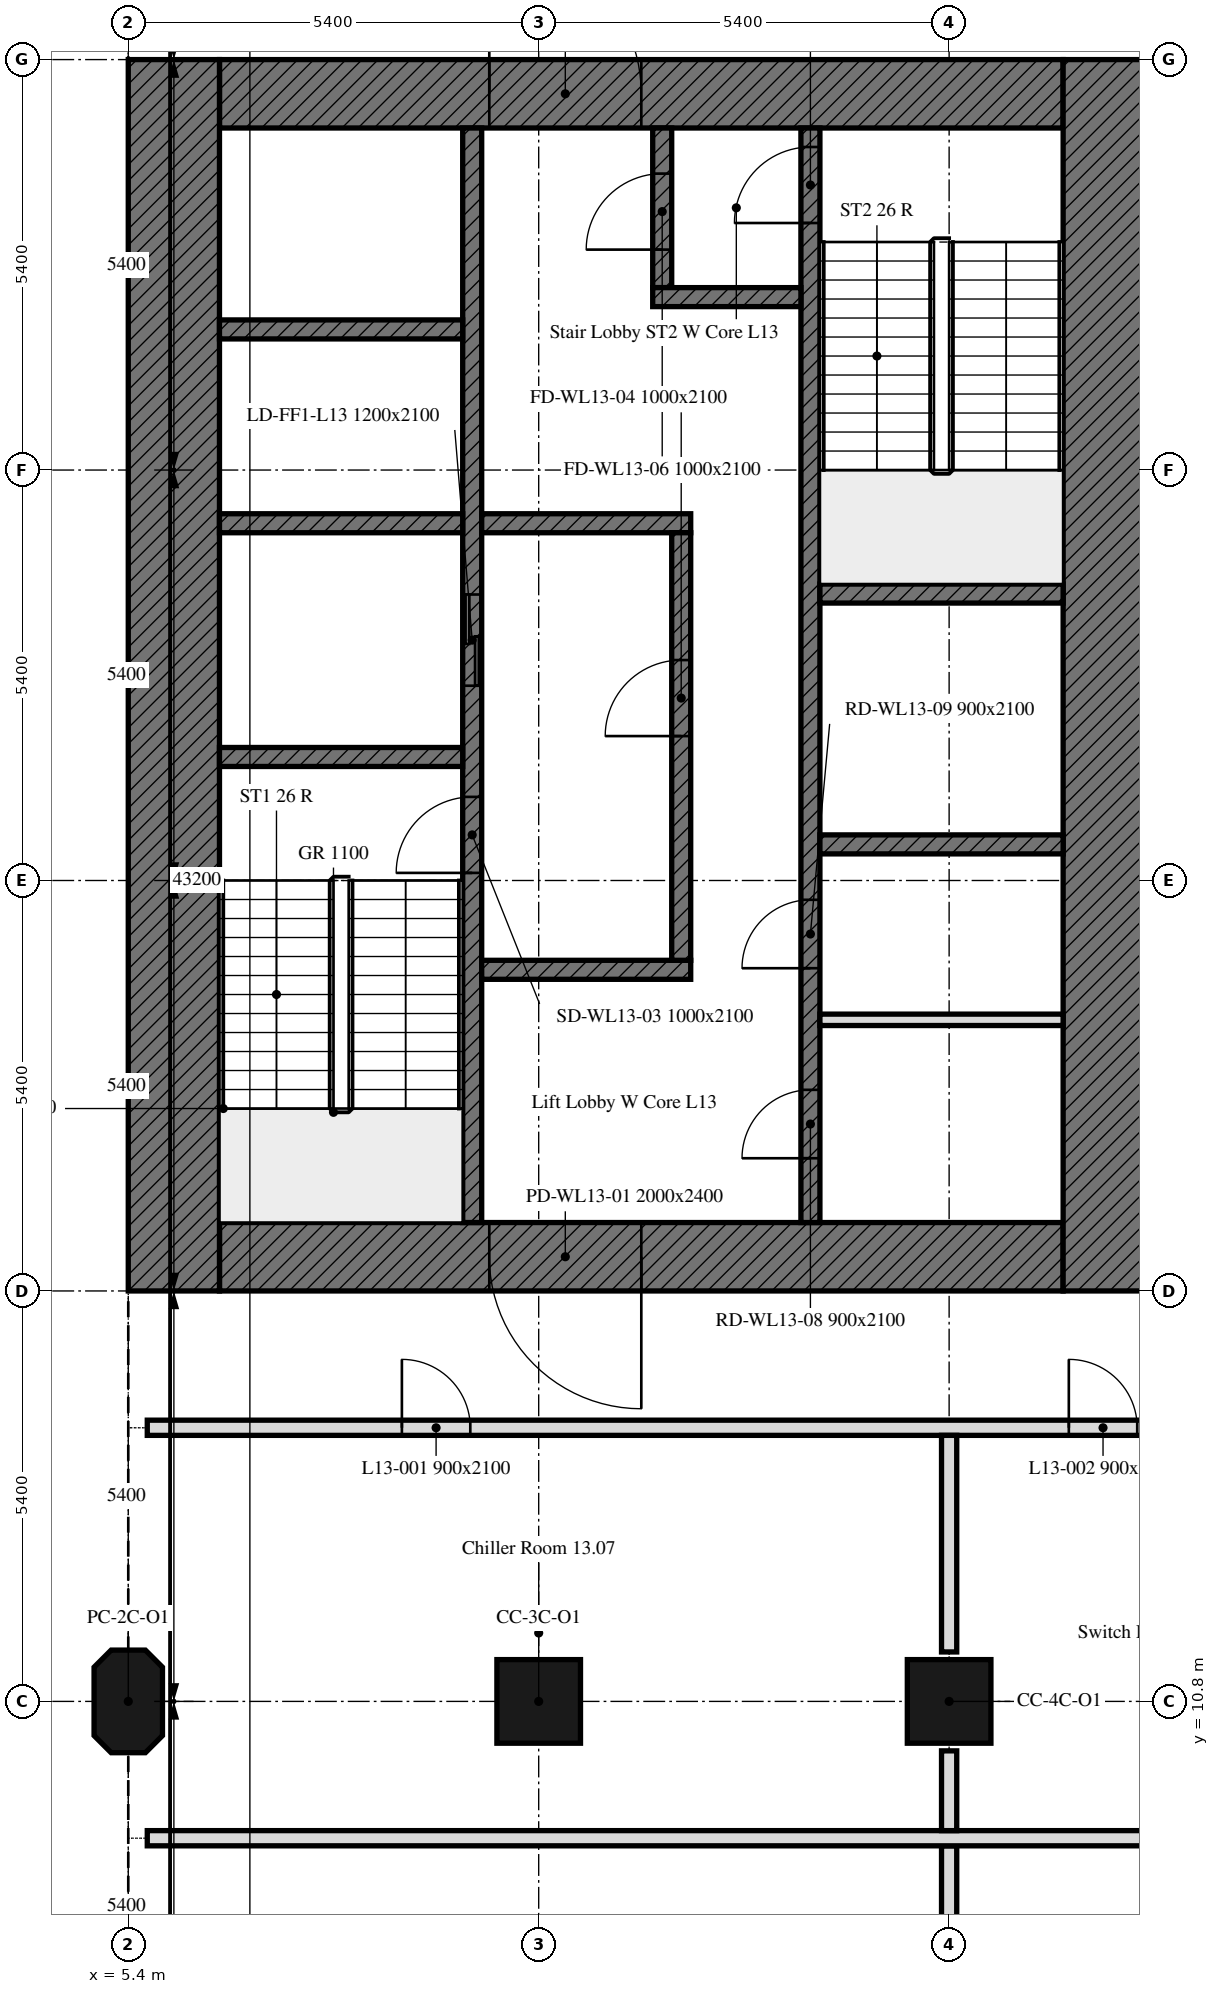
"""IFC4 building model, lengths in metres.
Left out: names, types, materials, properties, quantities, classifications, styles, units other than length and angle.
Written with IfcOpenShell. Run it as: python <this file> out.ifc"""

import sys

from ifc_helpers import new_model, si_unit, direction, frame, frame_2d, origin, origin_2d, place, context, subcontext, project, spatial, polyline, rectangle, outline, extrude, element, fill, save


model = new_model("IFC4")
c1 = context("Model", 3, precision=1e-05, world=origin(), true_north=direction((0.0, 1.0)))
c2 = subcontext(c1, "Body", "Model", "MODEL_VIEW")
j1 = project(units=[si_unit("LENGTHUNIT", "METRE"), si_unit("PLANEANGLEUNIT", "RADIAN")], contexts=[c1])
p1 = place(None, origin())
s1 = spatial("IfcSite", under=j1, at=p1, CompositionType="ELEMENT")
p2 = place(p1, origin())
s2 = spatial("IfcBuilding", under=s1, at=p2, CompositionType="ELEMENT")
p3 = place(p2, frame((0.0, 0.0, 60.2)))
s3 = spatial("IfcBuildingStorey", under=s2, at=p3, CompositionType="ELEMENT", Elevation=60.2)
p4 = place(p3, frame((5.4, 10.8, 0.0), z_axis=(0.0, 0.0, 1.0), x_axis=(0.0, 1.0, 0.0)))
e1 = element("IfcColumn", 1, at=p4, inside=s3, PredefinedType="COLUMN", context=c2, shape_type="SweptSolid", body=[
    extrude(outline(polyline([(-0.45, -0.45), (0.45, -0.45), (0.675, -0.225), (0.675, 0.225), (0.45, 0.45), (-0.45, 0.45), (-0.675, 0.225), (-0.675, -0.225), (-0.45, -0.45)])), origin(), (0.0, 0.0, 1.0), 4.5),
])
for number, where, z_axis, x_axis in (
    (2, (10.8, 10.8, 0.0), (0.0, 0.0, 1.0), (1.0, 0.0, 0.0)),
    (3, (16.2, 10.8, 0.0), (0.0, 0.0, 1.0), (1.0, 0.0, 0.0)),
):
    element("IfcColumn", number, at=place(p3, frame(where, z_axis=z_axis, x_axis=x_axis)), inside=s3, PredefinedType="COLUMN", context=c2, shape_type="SweptSolid", body=[
        extrude(rectangle(XDim=1.1, YDim=1.1, at=origin_2d()), origin(), (0.0, 0.0, 1.0), 4.5),
    ])
p5 = place(p3, frame((17.7, 16.65, 0.0), z_axis=(0.0, 0.0, 1.0), x_axis=(-1.0, 0.0, 0.0)))
e4 = element("IfcWall", 4, at=p5, inside=s3, PredefinedType="SOLIDWALL", context=c2, shape_type="SweptSolid", body=[
    extrude(rectangle(XDim=11.1, YDim=0.9, at=frame_2d((5.55, 0.0))), origin(), (0.0, 0.0, 1.0), 4.5),
])
p6 = place(p5, frame((5.55, 0.0, 0.0)))
e5 = element("IfcOpeningElement", 5, at=p6, cuts=e4, PredefinedType="OPENING", context=c2, shape_type="SweptSolid", body=[
    extrude(rectangle(XDim=2.0, YDim=2.4, at=frame_2d((1.0, 1.2))), frame((0.0, 0.45, 0.0), z_axis=(0.0, -1.0, 0.0), x_axis=(1.0, 0.0, 0.0)), (0.0, 0.0, 1.0), 0.9),
])
p7 = place(p3, frame((6.6, 31.95, 0.0), z_axis=(0.0, 0.0, 1.0), x_axis=(1.0, 0.0, 0.0)))
e6 = element("IfcWall", 6, at=p7, inside=s3, PredefinedType="SOLIDWALL", context=c2, shape_type="SweptSolid", body=[
    extrude(rectangle(XDim=11.1, YDim=0.9, at=frame_2d((5.55, 0.0))), origin(), (0.0, 0.0, 1.0), 4.5),
])
p8 = place(p7, frame((3.55, 0.0, 0.0)))
e7 = element("IfcOpeningElement", 7, at=p8, cuts=e6, PredefinedType="OPENING", context=c2, shape_type="SweptSolid", body=[
    extrude(rectangle(XDim=2.0, YDim=2.4, at=frame_2d((1.0, 1.2))), frame((0.0, 0.45, 0.0), z_axis=(0.0, -1.0, 0.0), x_axis=(1.0, 0.0, 0.0)), (0.0, 0.0, 1.0), 0.9),
])
for number, where, z_axis, x_axis in (
    (8, (6.0, 16.2, 0.0), (0.0, 0.0, 1.0), (0.0, 1.0, 0.0)),
    (9, (18.3, 32.4, 0.0), (0.0, 0.0, 1.0), (0.0, -1.0, 0.0)),
):
    element("IfcWall", number, at=place(p3, frame(where, z_axis=z_axis, x_axis=x_axis)), inside=s3, PredefinedType="SOLIDWALL", context=c2, shape_type="SweptSolid", body=[
        extrude(rectangle(XDim=16.2, YDim=1.2, at=frame_2d((8.1, 0.0))), origin(), (0.0, 0.0, 1.0), 4.5),
    ])
p9 = place(p3, frame((9.925, 17.1, 0.0), z_axis=(0.0, 0.0, 1.0), x_axis=(0.0, 1.0, 0.0)))
e10 = element("IfcWall", 10, at=p9, inside=s3, PredefinedType="SOLIDWALL", context=c2, shape_type="SweptSolid", body=[
    extrude(rectangle(XDim=14.4, YDim=0.25, at=frame_2d((7.2, 0.0))), origin(), (0.0, 0.0, 1.0), 4.5),
])
p10 = place(p9, frame((4.6, 0.0, 0.0)))
e11 = element("IfcOpeningElement", 11, at=p10, cuts=e10, PredefinedType="OPENING", context=c2, shape_type="SweptSolid", body=[
    extrude(rectangle(XDim=1.0, YDim=2.1, at=frame_2d((0.5, 1.05))), frame((0.0, 0.125, 0.0), z_axis=(0.0, -1.0, 0.0), x_axis=(1.0, 0.0, 0.0)), (0.0, 0.0, 1.0), 0.25),
])
p11 = place(p9, frame((7.062, 0.0, 0.0)))
e12 = element("IfcOpeningElement", 12, at=p11, cuts=e10, PredefinedType="OPENING", context=c2, shape_type="SweptSolid", body=[
    extrude(rectangle(XDim=1.2, YDim=2.1, at=frame_2d((0.6, 1.05))), frame((0.0, 0.125, 0.0), z_axis=(0.0, -1.0, 0.0), x_axis=(1.0, 0.0, 0.0)), (0.0, 0.0, 1.0), 0.25),
])
p12 = place(p3, frame((14.375, 17.1, 0.0), z_axis=(0.0, 0.0, 1.0), x_axis=(0.0, 1.0, 0.0)))
e13 = element("IfcWall", 13, at=p12, inside=s3, PredefinedType="SOLIDWALL", context=c2, shape_type="SweptSolid", body=[
    extrude(rectangle(XDim=14.4, YDim=0.25, at=frame_2d((7.2, 0.0))), origin(), (0.0, 0.0, 1.0), 4.5),
])
p13 = place(p12, frame((13.15, 0.0, 0.0)))
e14 = element("IfcOpeningElement", 14, at=p13, cuts=e13, PredefinedType="OPENING", context=c2, shape_type="SweptSolid", body=[
    extrude(rectangle(XDim=1.0, YDim=2.1, at=frame_2d((0.5, 1.05))), frame((0.0, 0.125, 0.0), z_axis=(0.0, -1.0, 0.0), x_axis=(1.0, 0.0, 0.0)), (0.0, 0.0, 1.0), 0.25),
])
p14 = place(p12, frame((0.846, 0.0, 0.0)))
e15 = element("IfcOpeningElement", 15, at=p14, cuts=e13, PredefinedType="OPENING", context=c2, shape_type="SweptSolid", body=[
    extrude(rectangle(XDim=0.9, YDim=2.1, at=frame_2d((0.45, 1.05))), frame((0.0, 0.125, 0.0), z_axis=(0.0, -1.0, 0.0), x_axis=(1.0, 0.0, 0.0)), (0.0, 0.0, 1.0), 0.25),
])
p15 = place(p12, frame((3.346, 0.0, 0.0)))
e16 = element("IfcOpeningElement", 16, at=p15, cuts=e13, PredefinedType="OPENING", context=c2, shape_type="SweptSolid", body=[
    extrude(rectangle(XDim=0.9, YDim=2.1, at=frame_2d((0.45, 1.05))), frame((0.0, 0.125, 0.0), z_axis=(0.0, -1.0, 0.0), x_axis=(1.0, 0.0, 0.0)), (0.0, 0.0, 1.0), 0.25),
])
for number, where, z_axis, x_axis in (
    (17, (6.6, 23.225, 0.0), (0.0, 0.0, 1.0), (1.0, 0.0, 0.0)),
    (18, (14.5, 25.375, 0.0), (0.0, 0.0, 1.0), (1.0, 0.0, 0.0)),
    (19, (14.5, 22.075, 0.0), (0.0, 0.0, 1.0), (1.0, 0.0, 0.0)),
    (20, (6.6, 26.3, 0.0), (0.0, 0.0, 1.0), (1.0, 0.0, 0.0)),
):
    element("IfcWall", number, at=place(p3, frame(where, z_axis=z_axis, x_axis=x_axis)), inside=s3, PredefinedType="SOLIDWALL", context=c2, shape_type="SweptSolid", body=[
        extrude(rectangle(XDim=3.2, YDim=0.25, at=frame_2d((1.6, 0.0))), origin(), (0.0, 0.0, 1.0), 4.5),
    ])
for number, where, z_axis, x_axis in (
    (21, (10.05, 26.3, 0.0), (0.0, 0.0, 1.0), (1.0, 0.0, 0.0)),
    (22, (10.05, 20.425, 0.0), (0.0, 0.0, 1.0), (1.0, 0.0, 0.0)),
):
    element("IfcWall", number, at=place(p3, frame(where, z_axis=z_axis, x_axis=x_axis)), inside=s3, PredefinedType="SOLIDWALL", context=c2, shape_type="SweptSolid", body=[
        extrude(rectangle(XDim=2.75, YDim=0.25, at=frame_2d((1.375, 0.0))), origin(), (0.0, 0.0, 1.0), 4.5),
    ])
p16 = place(p3, frame((12.425, 29.4, 0.0), z_axis=(0.0, 0.0, 1.0), x_axis=(0.0, 1.0, 0.0)))
e23 = element("IfcWall", 23, at=p16, inside=s3, PredefinedType="SOLIDWALL", context=c2, shape_type="SweptSolid", body=[
    extrude(rectangle(XDim=2.1, YDim=0.25, at=frame_2d((1.05, 0.0))), origin(), (0.0, 0.0, 1.0), 4.5),
])
p17 = place(p16, frame((0.5, 0.0, 0.0)))
e24 = element("IfcOpeningElement", 24, at=p17, cuts=e23, PredefinedType="OPENING", context=c2, shape_type="SweptSolid", body=[
    extrude(rectangle(XDim=1.0, YDim=2.1, at=frame_2d((0.5, 1.05))), frame((0.0, 0.125, 0.0), z_axis=(0.0, -1.0, 0.0), x_axis=(1.0, 0.0, 0.0)), (0.0, 0.0, 1.0), 0.25),
])
p18 = place(p3, frame((12.3, 29.275, 0.0), z_axis=(0.0, 0.0, 1.0), x_axis=(1.0, 0.0, 0.0)))
e25 = element("IfcWall", 25, at=p18, inside=s3, PredefinedType="SOLIDWALL", context=c2, shape_type="SweptSolid", body=[
    extrude(rectangle(XDim=1.95, YDim=0.25, at=frame_2d((0.975, 0.0))), origin(), (0.0, 0.0, 1.0), 4.5),
])
p19 = place(p3, frame((12.675, 20.55, 0.0), z_axis=(0.0, 0.0, 1.0), x_axis=(0.0, 1.0, 0.0)))
e26 = element("IfcWall", 26, at=p19, inside=s3, PredefinedType="SOLIDWALL", context=c2, shape_type="SweptSolid", body=[
    extrude(rectangle(XDim=5.625, YDim=0.25, at=frame_2d((2.812, 0.0))), origin(), (0.0, 0.0, 1.0), 4.5),
])
p20 = place(p19, frame((2.95, 0.0, 0.0)))
e27 = element("IfcOpeningElement", 27, at=p20, cuts=e26, PredefinedType="OPENING", context=c2, shape_type="SweptSolid", body=[
    extrude(rectangle(XDim=1.0, YDim=2.1, at=frame_2d((0.5, 1.05))), frame((0.0, 0.125, 0.0), z_axis=(0.0, -1.0, 0.0), x_axis=(1.0, 0.0, 0.0)), (0.0, 0.0, 1.0), 0.25),
])
p21 = place(p3, frame((6.6, 28.85, 0.0), z_axis=(0.0, 0.0, 1.0), x_axis=(1.0, 0.0, 0.0)))
e28 = element("IfcWall", 28, at=p21, inside=s3, PredefinedType="SOLIDWALL", context=c2, shape_type="SweptSolid", body=[
    extrude(rectangle(XDim=3.2, YDim=0.25, at=frame_2d((1.6, 0.0))), origin(), (0.0, 0.0, 1.0), 4.5),
])
p22 = place(p3, frame((14.5, 19.767, 0.0), z_axis=(0.0, 0.0, 1.0), x_axis=(1.0, 0.0, 0.0)))
e29 = element("IfcWall", 29, at=p22, inside=s3, PredefinedType="PARTITIONING", context=c2, shape_type="SweptSolid", body=[
    extrude(rectangle(XDim=3.2, YDim=0.15, at=frame_2d((1.6, 0.0))), origin(), (0.0, 0.0, 1.0), 4.5),
])
p23 = place(p3, frame((5.65, 14.4, 0.0), z_axis=(0.0, 0.0, 1.0), x_axis=(1.0, 0.0, 0.0)))
e30 = element("IfcWall", 30, at=p23, inside=s3, PredefinedType="PARTITIONING", context=c2, shape_type="SweptSolid", body=[
    extrude(rectangle(XDim=42.47, YDim=0.2, at=frame_2d((21.235, 0.0))), origin(), (0.0, 0.0, 1.0), 3.75),
])
p24 = place(p23, frame((3.35, 0.0, 0.0)))
e31 = element("IfcOpeningElement", 31, at=p24, cuts=e30, PredefinedType="OPENING", context=c2, shape_type="SweptSolid", body=[
    extrude(rectangle(XDim=0.9, YDim=2.1, at=frame_2d((0.45, 1.05))), frame((0.0, 0.1, 0.0), z_axis=(0.0, -1.0, 0.0), x_axis=(1.0, 0.0, 0.0)), (0.0, 0.0, 1.0), 0.2),
])
p25 = place(p23, frame((12.125, 0.0, 0.0)))
e32 = element("IfcOpeningElement", 32, at=p25, cuts=e30, PredefinedType="OPENING", context=c2, shape_type="SweptSolid", body=[
    extrude(rectangle(XDim=0.9, YDim=2.1, at=frame_2d((0.45, 1.05))), frame((0.0, 0.1, 0.0), z_axis=(0.0, -1.0, 0.0), x_axis=(1.0, 0.0, 0.0)), (0.0, 0.0, 1.0), 0.2),
])
p26 = place(p23, frame((24.95, 0.0, 0.0)))
e33 = element("IfcOpeningElement", 33, at=p26, cuts=e30, PredefinedType="OPENING", context=c2, shape_type="SweptSolid", body=[
    extrude(rectangle(XDim=0.9, YDim=2.1, at=frame_2d((0.45, 1.05))), frame((0.0, 0.1, 0.0), z_axis=(0.0, -1.0, 0.0), x_axis=(1.0, 0.0, 0.0)), (0.0, 0.0, 1.0), 0.2),
])
p27 = place(p23, frame((34.4, 0.0, 0.0)))
e34 = element("IfcOpeningElement", 34, at=p27, cuts=e30, PredefinedType="OPENING", context=c2, shape_type="SweptSolid", body=[
    extrude(rectangle(XDim=0.9, YDim=2.1, at=frame_2d((0.45, 1.05))), frame((0.0, 0.1, 0.0), z_axis=(0.0, -1.0, 0.0), x_axis=(1.0, 0.0, 0.0)), (0.0, 0.0, 1.0), 0.2),
])
p28 = place(p23, frame((39.8, 0.0, 0.0)))
e35 = element("IfcOpeningElement", 35, at=p28, cuts=e30, PredefinedType="OPENING", context=c2, shape_type="SweptSolid", body=[
    extrude(rectangle(XDim=0.9, YDim=2.1, at=frame_2d((0.45, 1.05))), frame((0.0, 0.1, 0.0), z_axis=(0.0, -1.0, 0.0), x_axis=(1.0, 0.0, 0.0)), (0.0, 0.0, 1.0), 0.2),
])
p29 = place(p23, frame((18.2, 0.0, 0.0)))
e36 = element("IfcOpeningElement", 36, at=p29, cuts=e30, PredefinedType="OPENING", context=c2, shape_type="SweptSolid", body=[
    extrude(rectangle(XDim=0.9, YDim=2.1, at=frame_2d((0.45, 1.05))), frame((0.0, 0.1, 0.0), z_axis=(0.0, -1.0, 0.0), x_axis=(1.0, 0.0, 0.0)), (0.0, 0.0, 1.0), 0.2),
])
p30 = place(p3, frame((16.2, 6.051, 0.0), z_axis=(0.0, 0.0, 1.0), x_axis=(0.0, 1.0, 0.0)))
e37 = element("IfcWall", 37, at=p30, inside=s3, PredefinedType="PARTITIONING", context=c2, shape_type="SweptSolid", body=[
    extrude(rectangle(XDim=2.849, YDim=0.2, at=frame_2d((1.425, 0.0))), origin(), (0.0, 0.0, 1.0), 3.75),
])
p31 = place(p3, frame((48.12, 9.0, 0.0), z_axis=(0.0, 0.0, 1.0), x_axis=(-1.0, 0.0, 0.0)))
e38 = element("IfcWall", 38, at=p31, inside=s3, PredefinedType="PARTITIONING", context=c2, shape_type="SweptSolid", body=[
    extrude(rectangle(XDim=42.47, YDim=0.2, at=frame_2d((21.235, 0.0))), origin(), (0.0, 0.0, 1.0), 3.75),
])
p32 = place(p31, frame((23.37, 0.0, 0.0)))
e39 = element("IfcOpeningElement", 39, at=p32, cuts=e38, PredefinedType="OPENING", context=c2, shape_type="SweptSolid", body=[
    extrude(rectangle(XDim=0.9, YDim=2.1, at=frame_2d((0.45, 1.05))), frame((0.0, 0.1, 0.0), z_axis=(0.0, -1.0, 0.0), x_axis=(1.0, 0.0, 0.0)), (0.0, 0.0, 1.0), 0.2),
])
p33 = place(p3, frame((16.2, 9.1, 0.0), z_axis=(0.0, 0.0, 1.0), x_axis=(0.0, 1.0, 0.0)))
e40 = element("IfcWall", 40, at=p33, inside=s3, PredefinedType="PARTITIONING", context=c2, shape_type="SweptSolid", body=[
    extrude(rectangle(XDim=1.049, YDim=0.2, at=frame_2d((0.525, 0.0))), origin(), (0.0, 0.0, 1.0), 3.75),
])
p34 = place(p3, frame((16.2, 11.451, 0.0), z_axis=(0.0, 0.0, 1.0), x_axis=(0.0, 1.0, 0.0)))
e41 = element("IfcWall", 41, at=p34, inside=s3, PredefinedType="PARTITIONING", context=c2, shape_type="SweptSolid", body=[
    extrude(rectangle(XDim=2.849, YDim=0.2, at=frame_2d((1.425, 0.0))), origin(), (0.0, 0.0, 1.0), 3.75),
])
p35 = place(p6, origin())
e42 = element("IfcDoor", 42, at=p35, inside=s3, OperationType="DOUBLE_DOOR_SINGLE_SWING", PredefinedType="DOOR", context=c2, shape_type="SweptSolid", body=[
    extrude(rectangle(XDim=2.0, YDim=2.4, at=frame_2d((1.0, 1.2))), frame((0.0, 0.025, 0.0), z_axis=(0.0, -1.0, 0.0), x_axis=(1.0, 0.0, 0.0)), (0.0, 0.0, 1.0), 0.05),
])
fill(e5, e42)
p36 = place(p8, origin())
e43 = element("IfcDoor", 43, at=p36, inside=s3, OperationType="DOUBLE_DOOR_SINGLE_SWING", PredefinedType="DOOR", context=c2, shape_type="SweptSolid", body=[
    extrude(rectangle(XDim=2.0, YDim=2.4, at=frame_2d((1.0, 1.2))), frame((0.0, 0.025, 0.0), z_axis=(0.0, -1.0, 0.0), x_axis=(1.0, 0.0, 0.0)), (0.0, 0.0, 1.0), 0.05),
])
fill(e7, e43)
p37 = place(p10, origin())
e44 = element("IfcDoor", 44, at=p37, inside=s3, OperationType="SINGLE_SWING_LEFT", PredefinedType="DOOR", context=c2, shape_type="SweptSolid", body=[
    extrude(rectangle(XDim=1.0, YDim=2.1, at=frame_2d((0.5, 1.05))), frame((0.0, 0.025, 0.0), z_axis=(0.0, -1.0, 0.0), x_axis=(1.0, 0.0, 0.0)), (0.0, 0.0, 1.0), 0.05),
])
fill(e11, e44)
p38 = place(p20, origin())
e45 = element("IfcDoor", 45, at=p38, inside=s3, OperationType="SINGLE_SWING_LEFT", PredefinedType="DOOR", context=c2, shape_type="SweptSolid", body=[
    extrude(rectangle(XDim=1.0, YDim=2.1, at=frame_2d((0.5, 1.05))), frame((0.0, 0.025, 0.0), z_axis=(0.0, -1.0, 0.0), x_axis=(1.0, 0.0, 0.0)), (0.0, 0.0, 1.0), 0.05),
])
fill(e27, e45)
p39 = place(p13, origin())
e46 = element("IfcDoor", 46, at=p39, inside=s3, OperationType="SINGLE_SWING_LEFT", PredefinedType="DOOR", context=c2, shape_type="SweptSolid", body=[
    extrude(rectangle(XDim=1.0, YDim=2.1, at=frame_2d((0.5, 1.05))), frame((0.0, 0.025, 0.0), z_axis=(0.0, -1.0, 0.0), x_axis=(1.0, 0.0, 0.0)), (0.0, 0.0, 1.0), 0.05),
])
fill(e14, e46)
p40 = place(p17, origin())
e47 = element("IfcDoor", 47, at=p40, inside=s3, OperationType="SINGLE_SWING_LEFT", PredefinedType="DOOR", context=c2, shape_type="SweptSolid", body=[
    extrude(rectangle(XDim=1.0, YDim=2.1, at=frame_2d((0.5, 1.05))), frame((0.0, 0.025, 0.0), z_axis=(0.0, -1.0, 0.0), x_axis=(1.0, 0.0, 0.0)), (0.0, 0.0, 1.0), 0.05),
])
fill(e24, e47)
p41 = place(p11, origin())
e48 = element("IfcDoor", 48, at=p41, inside=s3, OperationType="DOUBLE_DOOR_SLIDING", PredefinedType="DOOR", context=c2, shape_type="SweptSolid", body=[
    extrude(rectangle(XDim=1.2, YDim=2.1, at=frame_2d((0.6, 1.05))), frame((0.0, 0.025, 0.0), z_axis=(0.0, -1.0, 0.0), x_axis=(1.0, 0.0, 0.0)), (0.0, 0.0, 1.0), 0.05),
])
fill(e12, e48)
p42 = place(p14, origin())
e49 = element("IfcDoor", 49, at=p42, inside=s3, OperationType="SINGLE_SWING_LEFT", PredefinedType="DOOR", context=c2, shape_type="SweptSolid", body=[
    extrude(rectangle(XDim=0.9, YDim=2.1, at=frame_2d((0.45, 1.05))), frame((0.0, 0.025, 0.0), z_axis=(0.0, -1.0, 0.0), x_axis=(1.0, 0.0, 0.0)), (0.0, 0.0, 1.0), 0.05),
])
fill(e15, e49)
p43 = place(p15, origin())
e50 = element("IfcDoor", 50, at=p43, inside=s3, OperationType="SINGLE_SWING_LEFT", PredefinedType="DOOR", context=c2, shape_type="SweptSolid", body=[
    extrude(rectangle(XDim=0.9, YDim=2.1, at=frame_2d((0.45, 1.05))), frame((0.0, 0.025, 0.0), z_axis=(0.0, -1.0, 0.0), x_axis=(1.0, 0.0, 0.0)), (0.0, 0.0, 1.0), 0.05),
])
fill(e16, e50)
p44 = place(p24, origin())
e51 = element("IfcDoor", 51, at=p44, inside=s3, OperationType="SINGLE_SWING_LEFT", PredefinedType="DOOR", context=c2, shape_type="SweptSolid", body=[
    extrude(rectangle(XDim=0.9, YDim=2.1, at=frame_2d((0.45, 1.05))), frame((0.0, 0.025, 0.0), z_axis=(0.0, -1.0, 0.0), x_axis=(1.0, 0.0, 0.0)), (0.0, 0.0, 1.0), 0.05),
])
fill(e31, e51)
p45 = place(p25, origin())
e52 = element("IfcDoor", 52, at=p45, inside=s3, OperationType="SINGLE_SWING_LEFT", PredefinedType="DOOR", context=c2, shape_type="SweptSolid", body=[
    extrude(rectangle(XDim=0.9, YDim=2.1, at=frame_2d((0.45, 1.05))), frame((0.0, 0.025, 0.0), z_axis=(0.0, -1.0, 0.0), x_axis=(1.0, 0.0, 0.0)), (0.0, 0.0, 1.0), 0.05),
])
fill(e32, e52)
save(model, sys.argv[1])
